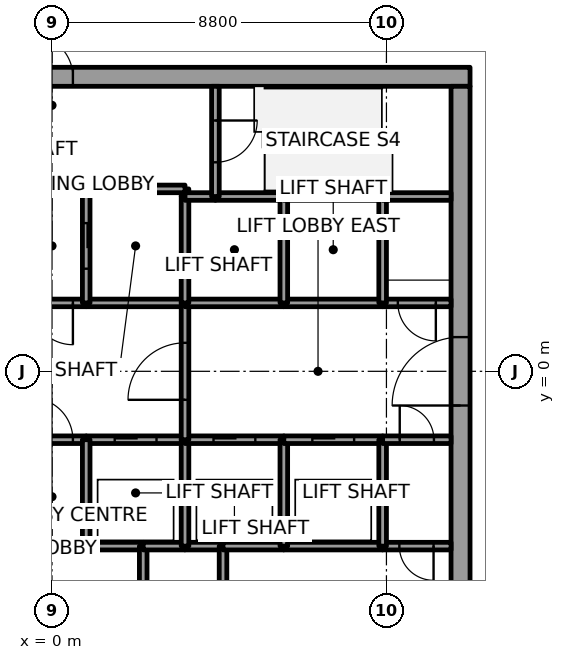
"""IFC4 building model, lengths in metres.
Left out: names, types, materials, properties, quantities, classifications, styles, units other than length and angle.
Written with IfcOpenShell. Run it as: python <this file> out.ifc"""

import sys

from ifc_helpers import new_model, si_unit, direction, frame, frame_2d, origin, place, context, subcontext, project, spatial, rectangle, extrude, element, fill, save


model = new_model("IFC4")
c1 = context("Model", 3, precision=1e-05, world=origin(), true_north=direction((0.0, 1.0)))
c2 = subcontext(c1, "Body", "Model", "MODEL_VIEW")
j1 = project(units=[si_unit("LENGTHUNIT", "METRE"), si_unit("PLANEANGLEUNIT", "RADIAN")], contexts=[c1])
p1 = place(None, origin())
s1 = spatial("IfcSite", under=j1, at=p1, CompositionType="ELEMENT")
p2 = place(p1, origin())
s2 = spatial("IfcBuilding", under=s1, at=p2, CompositionType="ELEMENT")
p3 = place(p2, frame((0.0, 0.0, 177.8)))
s3 = spatial("IfcBuildingStorey", under=s2, at=p3, CompositionType="ELEMENT", Elevation=177.8)
p4 = place(p3, frame((-11.0, 7.75, 0.0), z_axis=(0.0, 0.0, 1.0), x_axis=(1.0, 0.0, 0.0)))
e1 = element("IfcWall", 1, at=p4, inside=s3, PredefinedType="SHEAR", context=c2, shape_type="SweptSolid", body=[
    extrude(rectangle(XDim=22.0, YDim=0.5, at=frame_2d((11.0, 0.0))), origin(), (0.0, 0.0, 1.0), 4.0),
])
p5 = place(p4, frame((10.45, 0.0, 0.0)))
e2 = element("IfcOpeningElement", 2, at=p5, cuts=e1, PredefinedType="OPENING", context=c2, shape_type="SweptSolid", body=[
    extrude(rectangle(XDim=1.1, YDim=2.1, at=frame_2d((0.55, 1.05))), frame((0.0, 0.25, 0.0), z_axis=(0.0, -1.0, 0.0), x_axis=(1.0, 0.0, 0.0)), (0.0, 0.0, 1.0), 0.5),
])
p6 = place(p3, frame((10.75, -7.5, 0.0), z_axis=(0.0, 0.0, 1.0), x_axis=(0.0, 1.0, 0.0)))
e3 = element("IfcWall", 3, at=p6, inside=s3, PredefinedType="SHEAR", context=c2, shape_type="SweptSolid", body=[
    extrude(rectangle(XDim=15.0, YDim=0.5, at=frame_2d((7.5, 0.0))), origin(), (0.0, 0.0, 1.0), 4.0),
])
p7 = place(p6, frame((6.6, 0.0, 0.0)))
e4 = element("IfcOpeningElement", 4, at=p7, cuts=e3, PredefinedType="OPENING", context=c2, shape_type="SweptSolid", body=[
    extrude(rectangle(XDim=1.8, YDim=2.1, at=frame_2d((0.9, 1.05))), frame((0.0, 0.25, 0.0), z_axis=(0.0, -1.0, 0.0), x_axis=(1.0, 0.0, 0.0)), (0.0, 0.0, 1.0), 0.5),
])
p8 = place(p3, frame((-0.9, -1.8, 0.0), z_axis=(0.0, 0.0, 1.0), x_axis=(1.0, 0.0, 0.0)))
e5 = element("IfcWall", 5, at=p8, inside=s3, PredefinedType="SOLIDWALL", context=c2, shape_type="SweptSolid", body=[
    extrude(rectangle(XDim=1.8, YDim=0.2, at=frame_2d((0.9, 0.0))), origin(), (0.0, 0.0, 1.0), 3.85),
])
p9 = place(p8, frame((0.35, 0.0, 0.0)))
e6 = element("IfcOpeningElement", 6, at=p9, cuts=e5, PredefinedType="OPENING", context=c2, shape_type="SweptSolid", body=[
    extrude(rectangle(XDim=1.1, YDim=2.1, at=frame_2d((0.55, 1.05))), frame((0.0, 0.1, 0.0), z_axis=(0.0, -1.0, 0.0), x_axis=(1.0, 0.0, 0.0)), (0.0, 0.0, 1.0), 0.2),
])
p10 = place(p3, frame((0.9, 1.8, 0.0), z_axis=(0.0, 0.0, 1.0), x_axis=(-1.0, 0.0, 0.0)))
e7 = element("IfcWall", 7, at=p10, inside=s3, PredefinedType="SOLIDWALL", context=c2, shape_type="SweptSolid", body=[
    extrude(rectangle(XDim=1.8, YDim=0.2, at=frame_2d((0.9, 0.0))), origin(), (0.0, 0.0, 1.0), 3.85),
])
p11 = place(p10, frame((0.35, 0.0, 0.0)))
e8 = element("IfcOpeningElement", 8, at=p11, cuts=e7, PredefinedType="OPENING", context=c2, shape_type="SweptSolid", body=[
    extrude(rectangle(XDim=1.1, YDim=2.1, at=frame_2d((0.55, 1.05))), frame((0.0, 0.1, 0.0), z_axis=(0.0, -1.0, 0.0), x_axis=(1.0, 0.0, 0.0)), (0.0, 0.0, 1.0), 0.2),
])
p12 = place(p3, frame((0.9, -1.8, 0.0), z_axis=(0.0, 0.0, 1.0), x_axis=(1.0, 0.0, 0.0)))
e9 = element("IfcWall", 9, at=p12, inside=s3, PredefinedType="SOLIDWALL", context=c2, shape_type="SweptSolid", body=[
    extrude(rectangle(XDim=2.6, YDim=0.2, at=frame_2d((1.3, 0.0))), origin(), (0.0, 0.0, 1.0), 3.85),
])
p13 = place(p12, frame((0.75, 0.0, 0.0)))
e10 = element("IfcOpeningElement", 10, at=p13, cuts=e9, PredefinedType="OPENING", context=c2, shape_type="SweptSolid", body=[
    extrude(rectangle(XDim=1.1, YDim=2.1, at=frame_2d((0.55, 1.05))), frame((0.0, 0.1, 0.0), z_axis=(0.0, -1.0, 0.0), x_axis=(1.0, 0.0, 0.0)), (0.0, 0.0, 1.0), 0.2),
])
p14 = place(p3, frame((0.9, -1.8, 0.0), z_axis=(0.0, 0.0, 1.0), x_axis=(0.0, -1.0, 0.0)))
e11 = element("IfcWall", 11, at=p14, inside=s3, PredefinedType="SOLIDWALL", context=c2, shape_type="SweptSolid", body=[
    extrude(rectangle(XDim=2.8, YDim=0.2, at=frame_2d((1.4, 0.0))), origin(), (0.0, 0.0, 1.0), 3.85),
])
p15 = place(p3, frame((0.9, -4.6, 0.0), z_axis=(0.0, 0.0, 1.0), x_axis=(1.0, 0.0, 0.0)))
e12 = element("IfcWall", 12, at=p15, inside=s3, PredefinedType="SOLIDWALL", context=c2, shape_type="SweptSolid", body=[
    extrude(rectangle(XDim=1.5, YDim=0.2, at=frame_2d((0.75, 0.0))), origin(), (0.0, 0.0, 1.0), 3.85),
])
p16 = place(p3, frame((3.5, 1.8, 0.0), z_axis=(0.0, 0.0, 1.0), x_axis=(-1.0, 0.0, 0.0)))
e13 = element("IfcWall", 13, at=p16, inside=s3, PredefinedType="SOLIDWALL", context=c2, shape_type="SweptSolid", body=[
    extrude(rectangle(XDim=2.6, YDim=0.2, at=frame_2d((1.3, 0.0))), origin(), (0.0, 0.0, 1.0), 3.85),
])
p17 = place(p3, frame((3.5, 4.6, 0.0), z_axis=(0.0, 0.0, 1.0), x_axis=(0.0, 1.0, 0.0)))
e14 = element("IfcWall", 14, at=p17, inside=s3, PredefinedType="SOLIDWALL", context=c2, shape_type="SweptSolid", body=[
    extrude(rectangle(XDim=0.2, YDim=0.2, at=frame_2d((0.1, 0.0))), origin(), (0.0, 0.0, 1.0), 3.85),
])
p18 = place(p3, frame((3.5, 4.8, 0.0), z_axis=(0.0, 0.0, 1.0), x_axis=(-1.0, 0.0, 0.0)))
e15 = element("IfcWall", 15, at=p18, inside=s3, PredefinedType="SOLIDWALL", context=c2, shape_type="SweptSolid", body=[
    extrude(rectangle(XDim=2.6, YDim=0.2, at=frame_2d((1.3, 0.0))), origin(), (0.0, 0.0, 1.0), 3.85),
])
p19 = place(p3, frame((0.9, 4.8, 0.0), z_axis=(0.0, 0.0, 1.0), x_axis=(0.0, -1.0, 0.0)))
e16 = element("IfcWall", 16, at=p19, inside=s3, PredefinedType="SOLIDWALL", context=c2, shape_type="SweptSolid", body=[
    extrude(rectangle(XDim=3.0, YDim=0.2, at=frame_2d((1.5, 0.0))), origin(), (0.0, 0.0, 1.0), 3.85),
])
p20 = place(p19, frame((0.9, 0.0, 0.0)))
e17 = element("IfcOpeningElement", 17, at=p20, cuts=e16, PredefinedType="OPENING", context=c2, shape_type="SweptSolid", body=[
    extrude(rectangle(XDim=1.2, YDim=2.1, at=frame_2d((0.6, 1.05))), frame((0.0, 0.1, 0.0), z_axis=(0.0, -1.0, 0.0), x_axis=(1.0, 0.0, 0.0)), (0.0, 0.0, 1.0), 0.2),
])
p21 = place(p3, frame((2.4, -4.6, 0.0), z_axis=(0.0, 0.0, 1.0), x_axis=(0.0, -1.0, 0.0)))
e18 = element("IfcWall", 18, at=p21, inside=s3, PredefinedType="SOLIDWALL", context=c2, shape_type="SweptSolid", body=[
    extrude(rectangle(XDim=2.9, YDim=0.2, at=frame_2d((1.45, 0.0))), origin(), (0.0, 0.0, 1.0), 3.85),
])
p22 = place(p21, frame((1.0, 0.0, 0.0)))
e19 = element("IfcOpeningElement", 19, at=p22, cuts=e18, PredefinedType="OPENING", context=c2, shape_type="SweptSolid", body=[
    extrude(rectangle(XDim=0.9, YDim=2.1, at=frame_2d((0.45, 1.05))), frame((0.0, 0.1, 0.0), z_axis=(0.0, -1.0, 0.0), x_axis=(1.0, 0.0, 0.0)), (0.0, 0.0, 1.0), 0.2),
])
p23 = place(p3, frame((3.5, -4.6, 0.0), z_axis=(0.0, 0.0, 1.0), x_axis=(-1.0, 0.0, 0.0)))
e20 = element("IfcWall", 20, at=p23, inside=s3, PredefinedType="SOLIDWALL", context=c2, shape_type="SweptSolid", body=[
    extrude(rectangle(XDim=1.1, YDim=0.2, at=frame_2d((0.55, 0.0))), origin(), (0.0, 0.0, 1.0), 3.85),
])
p24 = place(p3, frame((4.5, -4.6, 0.0), z_axis=(0.0, 0.0, 1.0), x_axis=(-1.0, 0.0, 0.0)))
e21 = element("IfcWall", 21, at=p24, inside=s3, PredefinedType="SOLIDWALL", context=c2, shape_type="SweptSolid", body=[
    extrude(rectangle(XDim=1.0, YDim=0.2, at=frame_2d((0.5, 0.0))), origin(), (0.0, 0.0, 1.0), 3.85),
])
p25 = place(p3, frame((3.5, -4.6, 0.0), z_axis=(0.0, 0.0, 1.0), x_axis=(0.0, 1.0, 0.0)))
e22 = element("IfcWall", 22, at=p25, inside=s3, PredefinedType="SOLIDWALL", context=c2, shape_type="SweptSolid", body=[
    extrude(rectangle(XDim=2.8, YDim=0.2, at=frame_2d((1.4, 0.0))), origin(), (0.0, 0.0, 1.0), 3.85),
])
p26 = place(p3, frame((3.5, -1.8, 0.0), z_axis=(0.0, 0.0, 1.0), x_axis=(1.0, 0.0, 0.0)))
e23 = element("IfcWall", 23, at=p26, inside=s3, PredefinedType="SOLIDWALL", context=c2, shape_type="SweptSolid", body=[
    extrude(rectangle(XDim=2.6, YDim=0.2, at=frame_2d((1.3, 0.0))), origin(), (0.0, 0.0, 1.0), 3.85),
])
p27 = place(p26, frame((0.75, 0.0, 0.0)))
e24 = element("IfcOpeningElement", 24, at=p27, cuts=e23, PredefinedType="OPENING", context=c2, shape_type="SweptSolid", body=[
    extrude(rectangle(XDim=1.1, YDim=2.1, at=frame_2d((0.55, 1.05))), frame((0.0, 0.1, 0.0), z_axis=(0.0, -1.0, 0.0), x_axis=(1.0, 0.0, 0.0)), (0.0, 0.0, 1.0), 0.2),
])
p28 = place(p3, frame((3.5, -1.8, 0.0), z_axis=(0.0, 0.0, 1.0), x_axis=(0.0, 1.0, 0.0)))
e25 = element("IfcWall", 25, at=p28, inside=s3, PredefinedType="SOLIDWALL", context=c2, shape_type="SweptSolid", body=[
    extrude(rectangle(XDim=3.6, YDim=0.2, at=frame_2d((1.8, 0.0))), origin(), (0.0, 0.0, 1.0), 3.85),
])
p29 = place(p28, frame((1.05, 0.0, 0.0)))
e26 = element("IfcOpeningElement", 26, at=p29, cuts=e25, PredefinedType="OPENING", context=c2, shape_type="SweptSolid", body=[
    extrude(rectangle(XDim=1.5, YDim=2.1, at=frame_2d((0.75, 1.05))), frame((0.0, 0.1, 0.0), z_axis=(0.0, -1.0, 0.0), x_axis=(1.0, 0.0, 0.0)), (0.0, 0.0, 1.0), 0.2),
])
p30 = place(p3, frame((6.1, 1.8, 0.0), z_axis=(0.0, 0.0, 1.0), x_axis=(-1.0, 0.0, 0.0)))
e27 = element("IfcWall", 27, at=p30, inside=s3, PredefinedType="SOLIDWALL", context=c2, shape_type="SweptSolid", body=[
    extrude(rectangle(XDim=2.6, YDim=0.2, at=frame_2d((1.3, 0.0))), origin(), (0.0, 0.0, 1.0), 3.85),
])
p31 = place(p3, frame((3.5, 1.8, 0.0), z_axis=(0.0, 0.0, 1.0), x_axis=(0.0, 1.0, 0.0)))
e28 = element("IfcWall", 28, at=p31, inside=s3, PredefinedType="SOLIDWALL", context=c2, shape_type="SweptSolid", body=[
    extrude(rectangle(XDim=2.8, YDim=0.2, at=frame_2d((1.4, 0.0))), origin(), (0.0, 0.0, 1.0), 3.85),
])
p32 = place(p3, frame((4.3, 4.6, 0.0), z_axis=(0.0, 0.0, 1.0), x_axis=(-1.0, 0.0, 0.0)))
e29 = element("IfcWall", 29, at=p32, inside=s3, PredefinedType="SOLIDWALL", context=c2, shape_type="SweptSolid", body=[
    extrude(rectangle(XDim=0.8, YDim=0.2, at=frame_2d((0.4, 0.0))), origin(), (0.0, 0.0, 1.0), 3.85),
])
p33 = place(p3, frame((6.1, 4.6, 0.0), z_axis=(0.0, 0.0, 1.0), x_axis=(-1.0, 0.0, 0.0)))
e30 = element("IfcWall", 30, at=p33, inside=s3, PredefinedType="SOLIDWALL", context=c2, shape_type="SweptSolid", body=[
    extrude(rectangle(XDim=1.8, YDim=0.2, at=frame_2d((0.9, 0.0))), origin(), (0.0, 0.0, 1.0), 3.85),
])
p34 = place(p3, frame((4.3, 7.5, 0.0), z_axis=(0.0, 0.0, 1.0), x_axis=(0.0, -1.0, 0.0)))
e31 = element("IfcWall", 31, at=p34, inside=s3, PredefinedType="SOLIDWALL", context=c2, shape_type="SweptSolid", body=[
    extrude(rectangle(XDim=2.9, YDim=0.2, at=frame_2d((1.45, 0.0))), origin(), (0.0, 0.0, 1.0), 3.85),
])
p35 = place(p34, frame((0.9, 0.0, 0.0)))
e32 = element("IfcOpeningElement", 32, at=p35, cuts=e31, PredefinedType="OPENING", context=c2, shape_type="SweptSolid", body=[
    extrude(rectangle(XDim=1.1, YDim=2.1, at=frame_2d((0.55, 1.05))), frame((0.0, 0.1, 0.0), z_axis=(0.0, -1.0, 0.0), x_axis=(1.0, 0.0, 0.0)), (0.0, 0.0, 1.0), 0.2),
])
p36 = place(p3, frame((4.5, -4.6, 0.0), z_axis=(0.0, 0.0, 1.0), x_axis=(0.0, -1.0, 0.0)))
e33 = element("IfcWall", 33, at=p36, inside=s3, PredefinedType="SOLIDWALL", context=c2, shape_type="SweptSolid", body=[
    extrude(rectangle(XDim=2.9, YDim=0.2, at=frame_2d((1.45, 0.0))), origin(), (0.0, 0.0, 1.0), 3.85),
])
p37 = place(p3, frame((6.1, -4.6, 0.0), z_axis=(0.0, 0.0, 1.0), x_axis=(-1.0, 0.0, 0.0)))
e34 = element("IfcWall", 34, at=p37, inside=s3, PredefinedType="SOLIDWALL", context=c2, shape_type="SweptSolid", body=[
    extrude(rectangle(XDim=1.6, YDim=0.2, at=frame_2d((0.8, 0.0))), origin(), (0.0, 0.0, 1.0), 3.85),
])
p38 = place(p3, frame((8.7, -4.6, 0.0), z_axis=(0.0, 0.0, 1.0), x_axis=(-1.0, 0.0, 0.0)))
e35 = element("IfcWall", 35, at=p38, inside=s3, PredefinedType="SOLIDWALL", context=c2, shape_type="SweptSolid", body=[
    extrude(rectangle(XDim=2.6, YDim=0.2, at=frame_2d((1.3, 0.0))), origin(), (0.0, 0.0, 1.0), 3.85),
])
p39 = place(p3, frame((6.1, -4.6, 0.0), z_axis=(0.0, 0.0, 1.0), x_axis=(0.0, 1.0, 0.0)))
e36 = element("IfcWall", 36, at=p39, inside=s3, PredefinedType="SOLIDWALL", context=c2, shape_type="SweptSolid", body=[
    extrude(rectangle(XDim=2.8, YDim=0.2, at=frame_2d((1.4, 0.0))), origin(), (0.0, 0.0, 1.0), 3.85),
])
p40 = place(p3, frame((6.1, -1.8, 0.0), z_axis=(0.0, 0.0, 1.0), x_axis=(1.0, 0.0, 0.0)))
e37 = element("IfcWall", 37, at=p40, inside=s3, PredefinedType="SOLIDWALL", context=c2, shape_type="SweptSolid", body=[
    extrude(rectangle(XDim=2.6, YDim=0.2, at=frame_2d((1.3, 0.0))), origin(), (0.0, 0.0, 1.0), 3.85),
])
p41 = place(p40, frame((0.75, 0.0, 0.0)))
e38 = element("IfcOpeningElement", 38, at=p41, cuts=e37, PredefinedType="OPENING", context=c2, shape_type="SweptSolid", body=[
    extrude(rectangle(XDim=1.1, YDim=2.1, at=frame_2d((0.55, 1.05))), frame((0.0, 0.1, 0.0), z_axis=(0.0, -1.0, 0.0), x_axis=(1.0, 0.0, 0.0)), (0.0, 0.0, 1.0), 0.2),
])
p42 = place(p3, frame((8.7, 1.8, 0.0), z_axis=(0.0, 0.0, 1.0), x_axis=(-1.0, 0.0, 0.0)))
e39 = element("IfcWall", 39, at=p42, inside=s3, PredefinedType="SOLIDWALL", context=c2, shape_type="SweptSolid", body=[
    extrude(rectangle(XDim=2.6, YDim=0.2, at=frame_2d((1.3, 0.0))), origin(), (0.0, 0.0, 1.0), 3.85),
])
p43 = place(p3, frame((6.1, 1.8, 0.0), z_axis=(0.0, 0.0, 1.0), x_axis=(0.0, 1.0, 0.0)))
e40 = element("IfcWall", 40, at=p43, inside=s3, PredefinedType="SOLIDWALL", context=c2, shape_type="SweptSolid", body=[
    extrude(rectangle(XDim=2.8, YDim=0.2, at=frame_2d((1.4, 0.0))), origin(), (0.0, 0.0, 1.0), 3.85),
])
p44 = place(p3, frame((8.7, 4.6, 0.0), z_axis=(0.0, 0.0, 1.0), x_axis=(-1.0, 0.0, 0.0)))
e41 = element("IfcWall", 41, at=p44, inside=s3, PredefinedType="SOLIDWALL", context=c2, shape_type="SweptSolid", body=[
    extrude(rectangle(XDim=2.6, YDim=0.2, at=frame_2d((1.3, 0.0))), origin(), (0.0, 0.0, 1.0), 3.85),
])
p45 = place(p3, frame((10.5, -4.6, 0.0), z_axis=(0.0, 0.0, 1.0), x_axis=(-1.0, 0.0, 0.0)))
e42 = element("IfcWall", 42, at=p45, inside=s3, PredefinedType="SOLIDWALL", context=c2, shape_type="SweptSolid", body=[
    extrude(rectangle(XDim=1.8, YDim=0.2, at=frame_2d((0.9, 0.0))), origin(), (0.0, 0.0, 1.0), 3.85),
])
p46 = place(p45, frame((0.46, 0.0, 0.0)))
e43 = element("IfcOpeningElement", 43, at=p46, cuts=e42, PredefinedType="OPENING", context=c2, shape_type="SweptSolid", body=[
    extrude(rectangle(XDim=0.9, YDim=2.1, at=frame_2d((0.45, 1.05))), frame((0.0, 0.1, 0.0), z_axis=(0.0, -1.0, 0.0), x_axis=(1.0, 0.0, 0.0)), (0.0, 0.0, 1.0), 0.2),
])
p47 = place(p3, frame((8.7, -1.8, 0.0), z_axis=(0.0, 0.0, 1.0), x_axis=(0.0, -1.0, 0.0)))
e44 = element("IfcWall", 44, at=p47, inside=s3, PredefinedType="SOLIDWALL", context=c2, shape_type="SweptSolid", body=[
    extrude(rectangle(XDim=2.8, YDim=0.2, at=frame_2d((1.4, 0.0))), origin(), (0.0, 0.0, 1.0), 3.85),
])
p48 = place(p3, frame((8.7, -1.8, 0.0), z_axis=(0.0, 0.0, 1.0), x_axis=(1.0, 0.0, 0.0)))
e45 = element("IfcWall", 45, at=p48, inside=s3, PredefinedType="SOLIDWALL", context=c2, shape_type="SweptSolid", body=[
    extrude(rectangle(XDim=1.8, YDim=0.2, at=frame_2d((0.9, 0.0))), origin(), (0.0, 0.0, 1.0), 3.85),
])
p49 = place(p48, frame((0.45, 0.0, 0.0)))
e46 = element("IfcOpeningElement", 46, at=p49, cuts=e45, PredefinedType="OPENING", context=c2, shape_type="SweptSolid", body=[
    extrude(rectangle(XDim=0.9, YDim=2.1, at=frame_2d((0.45, 1.05))), frame((0.0, 0.1, 0.0), z_axis=(0.0, -1.0, 0.0), x_axis=(1.0, 0.0, 0.0)), (0.0, 0.0, 1.0), 0.2),
])
p50 = place(p3, frame((10.5, 1.8, 0.0), z_axis=(0.0, 0.0, 1.0), x_axis=(-1.0, 0.0, 0.0)))
e47 = element("IfcWall", 47, at=p50, inside=s3, PredefinedType="SOLIDWALL", context=c2, shape_type="SweptSolid", body=[
    extrude(rectangle(XDim=1.8, YDim=0.2, at=frame_2d((0.9, 0.0))), origin(), (0.0, 0.0, 1.0), 3.85),
])
p51 = place(p50, frame((0.4, 0.0, 0.0)))
e48 = element("IfcOpeningElement", 48, at=p51, cuts=e47, PredefinedType="OPENING", context=c2, shape_type="SweptSolid", body=[
    extrude(rectangle(XDim=1.0, YDim=2.1, at=frame_2d((0.5, 1.05))), frame((0.0, 0.1, 0.0), z_axis=(0.0, -1.0, 0.0), x_axis=(1.0, 0.0, 0.0)), (0.0, 0.0, 1.0), 0.2),
])
p52 = place(p3, frame((8.7, 4.6, 0.0), z_axis=(0.0, 0.0, 1.0), x_axis=(0.0, -1.0, 0.0)))
e49 = element("IfcWall", 49, at=p52, inside=s3, PredefinedType="SOLIDWALL", context=c2, shape_type="SweptSolid", body=[
    extrude(rectangle(XDim=2.8, YDim=0.2, at=frame_2d((1.4, 0.0))), origin(), (0.0, 0.0, 1.0), 3.85),
])
p53 = place(p3, frame((10.5, 4.6, 0.0), z_axis=(0.0, 0.0, 1.0), x_axis=(-1.0, 0.0, 0.0)))
e50 = element("IfcWall", 50, at=p53, inside=s3, PredefinedType="SOLIDWALL", context=c2, shape_type="SweptSolid", body=[
    extrude(rectangle(XDim=1.8, YDim=0.2, at=frame_2d((0.9, 0.0))), origin(), (0.0, 0.0, 1.0), 3.85),
])
p54 = place(p13, origin())
e51 = element("IfcDoor", 51, at=p54, inside=s3, OperationType="SLIDING_TO_RIGHT", PredefinedType="DOOR", context=c2, shape_type="SweptSolid", body=[
    extrude(rectangle(XDim=1.1, YDim=2.1, at=frame_2d((0.55, 1.05))), frame((0.0, 0.025, 0.0), z_axis=(0.0, -1.0, 0.0), x_axis=(1.0, 0.0, 0.0)), (0.0, 0.0, 1.0), 0.05),
])
fill(e10, e51)
p55 = place(p27, origin())
e52 = element("IfcDoor", 52, at=p55, inside=s3, OperationType="SLIDING_TO_LEFT", PredefinedType="DOOR", context=c2, shape_type="SweptSolid", body=[
    extrude(rectangle(XDim=1.1, YDim=2.1, at=frame_2d((0.55, 1.05))), frame((0.0, 0.025, 0.0), z_axis=(0.0, -1.0, 0.0), x_axis=(1.0, 0.0, 0.0)), (0.0, 0.0, 1.0), 0.05),
])
fill(e24, e52)
p56 = place(p41, origin())
e53 = element("IfcDoor", 53, at=p56, inside=s3, OperationType="SLIDING_TO_RIGHT", PredefinedType="DOOR", context=c2, shape_type="SweptSolid", body=[
    extrude(rectangle(XDim=1.1, YDim=2.1, at=frame_2d((0.55, 1.05))), frame((0.0, 0.025, 0.0), z_axis=(0.0, -1.0, 0.0), x_axis=(1.0, 0.0, 0.0)), (0.0, 0.0, 1.0), 0.05),
])
fill(e38, e53)
p57 = place(p20, origin())
e54 = element("IfcDoor", 54, at=p57, inside=s3, OperationType="SLIDING_TO_LEFT", PredefinedType="DOOR", context=c2, shape_type="SweptSolid", body=[
    extrude(rectangle(XDim=1.2, YDim=2.1, at=frame_2d((0.6, 1.05))), frame((0.0, 0.025, 0.0), z_axis=(0.0, -1.0, 0.0), x_axis=(1.0, 0.0, 0.0)), (0.0, 0.0, 1.0), 0.05),
])
fill(e17, e54)
p58 = place(p29, origin())
e55 = element("IfcDoor", 55, at=p58, inside=s3, OperationType="DOUBLE_DOOR_SINGLE_SWING", PredefinedType="DOOR", context=c2, shape_type="SweptSolid", body=[
    extrude(rectangle(XDim=1.5, YDim=2.1, at=frame_2d((0.75, 1.05))), frame((0.0, 0.025, 0.0), z_axis=(0.0, -1.0, 0.0), x_axis=(1.0, 0.0, 0.0)), (0.0, 0.0, 1.0), 0.05),
])
fill(e26, e55)
p59 = place(p11, origin())
e56 = element("IfcDoor", 56, at=p59, inside=s3, OperationType="SINGLE_SWING_RIGHT", PredefinedType="DOOR", context=c2, shape_type="SweptSolid", body=[
    extrude(rectangle(XDim=1.1, YDim=2.1, at=frame_2d((0.55, 1.05))), frame((0.0, 0.025, 0.0), z_axis=(0.0, -1.0, 0.0), x_axis=(1.0, 0.0, 0.0)), (0.0, 0.0, 1.0), 0.05),
])
fill(e8, e56)
p60 = place(p9, origin())
e57 = element("IfcDoor", 57, at=p60, inside=s3, OperationType="SINGLE_SWING_LEFT", PredefinedType="DOOR", context=c2, shape_type="SweptSolid", body=[
    extrude(rectangle(XDim=1.1, YDim=2.1, at=frame_2d((0.55, 1.05))), frame((0.0, 0.025, 0.0), z_axis=(0.0, -1.0, 0.0), x_axis=(1.0, 0.0, 0.0)), (0.0, 0.0, 1.0), 0.05),
])
fill(e6, e57)
p61 = place(p51, origin())
e58 = element("IfcDoor", 58, at=p61, inside=s3, OperationType="SINGLE_SWING_LEFT", PredefinedType="DOOR", context=c2, shape_type="SweptSolid", body=[
    extrude(rectangle(XDim=1.0, YDim=2.1, at=frame_2d((0.5, 1.05))), frame((0.0, 0.025, 0.0), z_axis=(0.0, -1.0, 0.0), x_axis=(1.0, 0.0, 0.0)), (0.0, 0.0, 1.0), 0.05),
])
fill(e48, e58)
p62 = place(p35, origin())
e59 = element("IfcDoor", 59, at=p62, inside=s3, OperationType="SINGLE_SWING_RIGHT", PredefinedType="DOOR", context=c2, shape_type="SweptSolid", body=[
    extrude(rectangle(XDim=1.1, YDim=2.1, at=frame_2d((0.55, 1.05))), frame((0.0, 0.025, 0.0), z_axis=(0.0, -1.0, 0.0), x_axis=(1.0, 0.0, 0.0)), (0.0, 0.0, 1.0), 0.05),
])
fill(e32, e59)
p63 = place(p46, origin())
e60 = element("IfcDoor", 60, at=p63, inside=s3, OperationType="SINGLE_SWING_LEFT", PredefinedType="DOOR", context=c2, shape_type="SweptSolid", body=[
    extrude(rectangle(XDim=0.9, YDim=2.1, at=frame_2d((0.45, 1.05))), frame((0.0, 0.025, 0.0), z_axis=(0.0, -1.0, 0.0), x_axis=(1.0, 0.0, 0.0)), (0.0, 0.0, 1.0), 0.05),
])
fill(e43, e60)
p64 = place(p49, origin())
e61 = element("IfcDoor", 61, at=p64, inside=s3, OperationType="SINGLE_SWING_LEFT", PredefinedType="DOOR", context=c2, shape_type="SweptSolid", body=[
    extrude(rectangle(XDim=0.9, YDim=2.1, at=frame_2d((0.45, 1.05))), frame((0.0, 0.025, 0.0), z_axis=(0.0, -1.0, 0.0), x_axis=(1.0, 0.0, 0.0)), (0.0, 0.0, 1.0), 0.05),
])
fill(e46, e61)
p65 = place(p7, origin())
e62 = element("IfcDoor", 62, at=p65, inside=s3, OperationType="DOUBLE_DOOR_SINGLE_SWING", PredefinedType="DOOR", context=c2, shape_type="SweptSolid", body=[
    extrude(rectangle(XDim=1.8, YDim=2.1, at=frame_2d((0.9, 1.05))), frame((0.0, 0.025, 0.0), z_axis=(0.0, -1.0, 0.0), x_axis=(1.0, 0.0, 0.0)), (0.0, 0.0, 1.0), 0.05),
])
fill(e4, e62)
p66 = place(p5, origin())
e63 = element("IfcDoor", 63, at=p66, inside=s3, OperationType="SINGLE_SWING_RIGHT", PredefinedType="DOOR", context=c2, shape_type="SweptSolid", body=[
    extrude(rectangle(XDim=1.1, YDim=2.1, at=frame_2d((0.55, 1.05))), frame((0.0, 0.025, 0.0), z_axis=(0.0, -1.0, 0.0), x_axis=(1.0, 0.0, 0.0)), (0.0, 0.0, 1.0), 0.05),
])
fill(e2, e63)
save(model, sys.argv[1])
